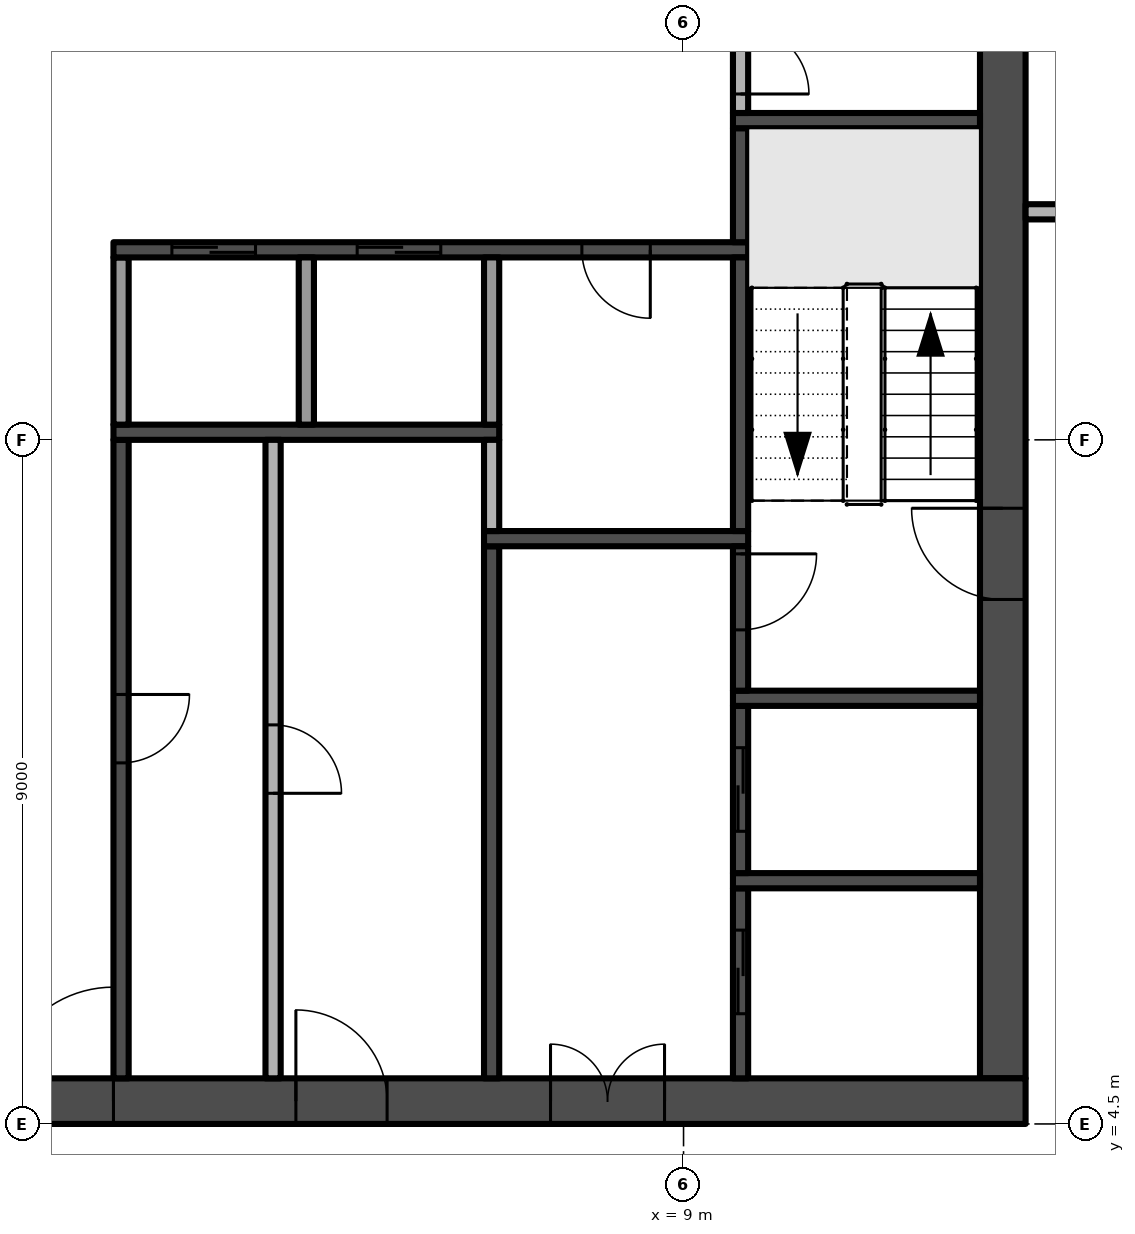
"""IFC4 building model, lengths in metres.
Left out: names, types, materials, properties, quantities, classifications, styles, units other than length and angle.
Written with IfcOpenShell. Run it as: python <this file> out.ifc"""

import sys

from ifc_helpers import new_model, si_unit, direction, frame, frame_2d, origin, place, context, subcontext, project, spatial, rectangle, extrude, element, fill, save


model = new_model("IFC4")
c1 = context("Model", 3, precision=1e-05, world=origin(), true_north=direction((0.0, 1.0)))
c2 = subcontext(c1, "Body", "Model", "MODEL_VIEW")
j1 = project(units=[si_unit("LENGTHUNIT", "METRE"), si_unit("PLANEANGLEUNIT", "RADIAN")], contexts=[c1])
p1 = place(None, origin())
s1 = spatial("IfcSite", under=j1, at=p1, CompositionType="ELEMENT")
p2 = place(p1, origin())
s2 = spatial("IfcBuilding", under=s1, at=p2, CompositionType="ELEMENT")
p3 = place(p2, frame((0.0, 0.0, 269.2)))
s3 = spatial("IfcBuildingStorey", under=s2, at=p3, CompositionType="ELEMENT", Elevation=269.2)
p4 = place(p3, frame((-13.5, 4.8, -0.3), z_axis=(0.0, 0.0, 1.0), x_axis=(1.0, 0.0, 0.0)))
e1 = element("IfcWall", 1, at=p4, inside=s3, PredefinedType="SHEAR", context=c2, shape_type="SweptSolid", body=[
    extrude(rectangle(XDim=27.0, YDim=0.6, at=frame_2d((13.5, 0.0))), origin(), (0.0, 0.0, 1.0), 3.8),
])
p5 = place(p4, frame((12.0, 0.0, 0.3)))
e2 = element("IfcOpeningElement", 2, at=p5, cuts=e1, PredefinedType="OPENING", context=c2, shape_type="SweptSolid", body=[
    extrude(rectangle(XDim=3.0, YDim=2.4, at=frame_2d((1.5, 1.2))), frame((0.0, 0.31, 0.0), z_axis=(0.0, -1.0, 0.0), x_axis=(1.0, 0.0, 0.0)), (0.0, 0.0, 1.0), 0.62),
])
p6 = place(p4, frame((4.9, 0.0, 0.3)))
e3 = element("IfcOpeningElement", 3, at=p6, cuts=e1, PredefinedType="OPENING", context=c2, shape_type="SweptSolid", body=[
    extrude(rectangle(XDim=1.2, YDim=2.2, at=frame_2d((0.6, 1.1))), frame((0.0, 0.31, 0.0), z_axis=(0.0, -1.0, 0.0), x_axis=(1.0, 0.0, 0.0)), (0.0, 0.0, 1.0), 0.62),
])
p7 = place(p4, frame((20.75, 0.0, 0.3)))
e4 = element("IfcOpeningElement", 4, at=p7, cuts=e1, PredefinedType="OPENING", context=c2, shape_type="SweptSolid", body=[
    extrude(rectangle(XDim=1.5, YDim=2.2, at=frame_2d((0.75, 1.1))), frame((0.0, 0.31, 0.0), z_axis=(0.0, -1.0, 0.0), x_axis=(1.0, 0.0, 0.0)), (0.0, 0.0, 1.0), 0.62),
])
p8 = place(p4, frame((17.4, 0.0, 0.3)))
e5 = element("IfcOpeningElement", 5, at=p8, cuts=e1, PredefinedType="OPENING", context=c2, shape_type="SweptSolid", body=[
    extrude(rectangle(XDim=1.2, YDim=2.2, at=frame_2d((0.6, 1.1))), frame((0.0, 0.31, 0.0), z_axis=(0.0, -1.0, 0.0), x_axis=(1.0, 0.0, 0.0)), (0.0, 0.0, 1.0), 0.62),
])
p9 = place(p3, frame((13.2, 5.1, -0.3), z_axis=(0.0, 0.0, 1.0), x_axis=(0.0, 1.0, 0.0)))
e6 = element("IfcWall", 6, at=p9, inside=s3, PredefinedType="SHEAR", context=c2, shape_type="SweptSolid", body=[
    extrude(rectangle(XDim=16.8, YDim=0.6, at=frame_2d((8.4, 0.0))), origin(), (0.0, 0.0, 1.0), 3.8),
])
p10 = place(p9, frame((6.3, 0.0, 0.3)))
e7 = element("IfcOpeningElement", 7, at=p10, cuts=e6, PredefinedType="OPENING", context=c2, shape_type="SweptSolid", body=[
    extrude(rectangle(XDim=1.2, YDim=2.2, at=frame_2d((0.6, 1.1))), frame((0.0, 0.31, 0.0), z_axis=(0.0, -1.0, 0.0), x_axis=(1.0, 0.0, 0.0)), (0.0, 0.0, 1.0), 0.62),
])
p11 = place(p3, frame((1.6, 13.5, 0.0), z_axis=(0.0, 0.0, 1.0), x_axis=(0.0, -1.0, 0.0)))
e8 = element("IfcWall", 8, at=p11, inside=s3, PredefinedType="SHEAR", context=c2, shape_type="SweptSolid", body=[
    extrude(rectangle(XDim=8.4, YDim=0.2, at=frame_2d((4.2, 0.0))), origin(), (0.0, 0.0, 1.0), 3.5),
])
p12 = place(p11, frame((3.35, 0.0, 0.0)))
e9 = element("IfcOpeningElement", 9, at=p12, cuts=e8, PredefinedType="OPENING", context=c2, shape_type="SweptSolid", body=[
    extrude(rectangle(XDim=0.9, YDim=2.1, at=frame_2d((0.45, 1.05))), frame((0.0, 0.11, 0.0), z_axis=(0.0, -1.0, 0.0), x_axis=(1.0, 0.0, 0.0)), (0.0, 0.0, 1.0), 0.22),
])
p13 = place(p3, frame((1.5, 13.6, 0.0), z_axis=(0.0, 0.0, 1.0), x_axis=(1.0, 0.0, 0.0)))
e10 = element("IfcWall", 10, at=p13, inside=s3, PredefinedType="SHEAR", context=c2, shape_type="SweptSolid", body=[
    extrude(rectangle(XDim=5.075, YDim=0.2, at=frame_2d((2.538, 0.0))), origin(), (0.0, 0.0, 1.0), 3.5),
])
p14 = place(p3, frame((1.6, 13.7, 0.0), z_axis=(0.0, 0.0, 1.0), x_axis=(0.0, 1.0, 0.0)))
e11 = element("IfcWall", 11, at=p14, inside=s3, PredefinedType="PARTITIONING", context=c2, shape_type="SweptSolid", body=[
    extrude(rectangle(XDim=2.2, YDim=0.2, at=frame_2d((1.1, 0.0))), origin(), (0.0, 0.0, 1.0), 3.5),
])
p15 = place(p3, frame((9.85, 16.0, 0.0), z_axis=(0.0, 0.0, 1.0), x_axis=(-1.0, 0.0, 0.0)))
e12 = element("IfcWall", 12, at=p15, inside=s3, PredefinedType="SHEAR", context=c2, shape_type="SweptSolid", body=[
    extrude(rectangle(XDim=8.35, YDim=0.2, at=frame_2d((4.175, 0.0))), origin(), (0.0, 0.0, 1.0), 3.5),
])
p16 = place(p15, frame((6.481, 0.0, 0.0)))
e13 = element("IfcOpeningElement", 13, at=p16, cuts=e12, PredefinedType="OPENING", context=c2, shape_type="SweptSolid", body=[
    extrude(rectangle(XDim=1.1, YDim=2.1, at=frame_2d((0.55, 1.05))), frame((0.0, 0.11, 0.0), z_axis=(0.0, -1.0, 0.0), x_axis=(1.0, 0.0, 0.0)), (0.0, 0.0, 1.0), 0.22),
])
p17 = place(p15, frame((4.044, 0.0, 0.0)))
e14 = element("IfcOpeningElement", 14, at=p17, cuts=e12, PredefinedType="OPENING", context=c2, shape_type="SweptSolid", body=[
    extrude(rectangle(XDim=1.1, YDim=2.1, at=frame_2d((0.55, 1.05))), frame((0.0, 0.11, 0.0), z_axis=(0.0, -1.0, 0.0), x_axis=(1.0, 0.0, 0.0)), (0.0, 0.0, 1.0), 0.22),
])
p18 = place(p15, frame((1.288, 0.0, 0.0)))
e15 = element("IfcOpeningElement", 15, at=p18, cuts=e12, PredefinedType="OPENING", context=c2, shape_type="SweptSolid", body=[
    extrude(rectangle(XDim=0.9, YDim=2.1, at=frame_2d((0.45, 1.05))), frame((0.0, 0.11, 0.0), z_axis=(0.0, -1.0, 0.0), x_axis=(1.0, 0.0, 0.0)), (0.0, 0.0, 1.0), 0.22),
])
p19 = place(p3, frame((3.6, 13.5, 0.0), z_axis=(0.0, 0.0, 1.0), x_axis=(0.0, -1.0, 0.0)))
e16 = element("IfcWall", 16, at=p19, inside=s3, PredefinedType="PARTITIONING", context=c2, shape_type="SweptSolid", body=[
    extrude(rectangle(XDim=8.4, YDim=0.2, at=frame_2d((4.2, 0.0))), origin(), (0.0, 0.0, 1.0), 3.5),
])
p20 = place(p19, frame((3.75, 0.0, 0.0)))
e17 = element("IfcOpeningElement", 17, at=p20, cuts=e16, PredefinedType="OPENING", context=c2, shape_type="SweptSolid", body=[
    extrude(rectangle(XDim=0.9, YDim=2.1, at=frame_2d((0.45, 1.05))), frame((0.0, 0.11, 0.0), z_axis=(0.0, -1.0, 0.0), x_axis=(1.0, 0.0, 0.0)), (0.0, 0.0, 1.0), 0.22),
])
p21 = place(p3, frame((4.037, 13.7, 0.0), z_axis=(0.0, 0.0, 1.0), x_axis=(0.0, 1.0, 0.0)))
e18 = element("IfcWall", 18, at=p21, inside=s3, PredefinedType="PARTITIONING", context=c2, shape_type="SweptSolid", body=[
    extrude(rectangle(XDim=2.2, YDim=0.2, at=frame_2d((1.1, 0.0))), origin(), (0.0, 0.0, 1.0), 3.5),
])
p22 = place(p3, frame((6.475, 5.1, 0.0), z_axis=(0.0, 0.0, 1.0), x_axis=(0.0, 1.0, 0.0)))
e19 = element("IfcWall", 19, at=p22, inside=s3, PredefinedType="SHEAR", context=c2, shape_type="SweptSolid", body=[
    extrude(rectangle(XDim=7.0, YDim=0.2, at=frame_2d((3.5, 0.0))), origin(), (0.0, 0.0, 1.0), 3.5),
])
p23 = place(p3, frame((6.375, 12.2, 0.0), z_axis=(0.0, 0.0, 1.0), x_axis=(1.0, 0.0, 0.0)))
e20 = element("IfcWall", 20, at=p23, inside=s3, PredefinedType="SHEAR", context=c2, shape_type="SweptSolid", body=[
    extrude(rectangle(XDim=3.475, YDim=0.2, at=frame_2d((1.738, 0.0))), origin(), (0.0, 0.0, 1.0), 3.5),
])
p24 = place(p3, frame((6.475, 12.3, 0.0), z_axis=(0.0, 0.0, 1.0), x_axis=(0.0, 1.0, 0.0)))
e21 = element("IfcWall", 21, at=p24, inside=s3, PredefinedType="PARTITIONING", context=c2, shape_type="SweptSolid", body=[
    extrude(rectangle(XDim=1.2, YDim=0.2, at=frame_2d((0.6, 0.0))), origin(), (0.0, 0.0, 1.0), 3.5),
])
p25 = place(p3, frame((6.475, 13.7, 0.0), z_axis=(0.0, 0.0, 1.0), x_axis=(0.0, 1.0, 0.0)))
e22 = element("IfcWall", 22, at=p25, inside=s3, PredefinedType="PARTITIONING", context=c2, shape_type="SweptSolid", body=[
    extrude(rectangle(XDim=2.2, YDim=0.2, at=frame_2d((1.1, 0.0))), origin(), (0.0, 0.0, 1.0), 3.5),
])
p26 = place(p3, frame((9.75, 5.1, 0.0), z_axis=(0.0, 0.0, 1.0), x_axis=(0.0, 1.0, 0.0)))
e23 = element("IfcWall", 23, at=p26, inside=s3, PredefinedType="SHEAR", context=c2, shape_type="SweptSolid", body=[
    extrude(rectangle(XDim=2.5, YDim=0.2, at=frame_2d((1.25, 0.0))), origin(), (0.0, 0.0, 1.0), 3.5),
])
p27 = place(p26, frame((0.85, 0.0, 0.0)))
e24 = element("IfcOpeningElement", 24, at=p27, cuts=e23, PredefinedType="OPENING", context=c2, shape_type="SweptSolid", body=[
    extrude(rectangle(XDim=1.1, YDim=2.1, at=frame_2d((0.55, 1.05))), frame((0.0, 0.11, 0.0), z_axis=(0.0, -1.0, 0.0), x_axis=(1.0, 0.0, 0.0)), (0.0, 0.0, 1.0), 0.22),
])
p28 = place(p3, frame((9.65, 7.7, 0.0), z_axis=(0.0, 0.0, 1.0), x_axis=(1.0, 0.0, 0.0)))
e25 = element("IfcWall", 25, at=p28, inside=s3, PredefinedType="SHEAR", context=c2, shape_type="SweptSolid", body=[
    extrude(rectangle(XDim=3.25, YDim=0.2, at=frame_2d((1.625, 0.0))), origin(), (0.0, 0.0, 1.0), 3.5),
])
p29 = place(p3, frame((9.75, 7.8, 0.0), z_axis=(0.0, 0.0, 1.0), x_axis=(0.0, 1.0, 0.0)))
e26 = element("IfcWall", 26, at=p29, inside=s3, PredefinedType="SHEAR", context=c2, shape_type="SweptSolid", body=[
    extrude(rectangle(XDim=2.2, YDim=0.2, at=frame_2d((1.1, 0.0))), origin(), (0.0, 0.0, 1.0), 3.5),
])
p30 = place(p29, frame((0.55, 0.0, 0.0)))
e27 = element("IfcOpeningElement", 27, at=p30, cuts=e26, PredefinedType="OPENING", context=c2, shape_type="SweptSolid", body=[
    extrude(rectangle(XDim=1.1, YDim=2.1, at=frame_2d((0.55, 1.05))), frame((0.0, 0.11, 0.0), z_axis=(0.0, -1.0, 0.0), x_axis=(1.0, 0.0, 0.0)), (0.0, 0.0, 1.0), 0.22),
])
p31 = place(p3, frame((9.65, 10.1, 0.0), z_axis=(0.0, 0.0, 1.0), x_axis=(1.0, 0.0, 0.0)))
e28 = element("IfcWall", 28, at=p31, inside=s3, PredefinedType="SHEAR", context=c2, shape_type="SweptSolid", body=[
    extrude(rectangle(XDim=3.25, YDim=0.2, at=frame_2d((1.625, 0.0))), origin(), (0.0, 0.0, 1.0), 3.5),
])
p32 = place(p3, frame((9.75, 12.1, 0.0), z_axis=(0.0, 0.0, 1.0), x_axis=(0.0, -1.0, 0.0)))
e29 = element("IfcWall", 29, at=p32, inside=s3, PredefinedType="SHEAR", context=c2, shape_type="SweptSolid", body=[
    extrude(rectangle(XDim=1.9, YDim=0.2, at=frame_2d((0.95, 0.0))), origin(), (0.0, 0.0, 1.0), 3.5),
])
p33 = place(p32, frame((0.1, 0.0, 0.0)))
e30 = element("IfcOpeningElement", 30, at=p33, cuts=e29, PredefinedType="OPENING", context=c2, shape_type="SweptSolid", body=[
    extrude(rectangle(XDim=1.0, YDim=2.2, at=frame_2d((0.5, 1.1))), frame((0.0, 0.11, 0.0), z_axis=(0.0, -1.0, 0.0), x_axis=(1.0, 0.0, 0.0)), (0.0, 0.0, 1.0), 0.22),
])
p34 = place(p3, frame((9.75, 12.3, 0.0), z_axis=(0.0, 0.0, 1.0), x_axis=(0.0, 1.0, 0.0)))
e31 = element("IfcWall", 31, at=p34, inside=s3, PredefinedType="SHEAR", context=c2, shape_type="SweptSolid", body=[
    extrude(rectangle(XDim=3.6, YDim=0.2, at=frame_2d((1.8, 0.0))), origin(), (0.0, 0.0, 1.0), 3.5),
])
p35 = place(p3, frame((9.75, 16.1, 0.0), z_axis=(0.0, 0.0, 1.0), x_axis=(0.0, 1.0, 0.0)))
e32 = element("IfcWall", 32, at=p35, inside=s3, PredefinedType="SHEAR", context=c2, shape_type="SweptSolid", body=[
    extrude(rectangle(XDim=1.5, YDim=0.2, at=frame_2d((0.75, 0.0))), origin(), (0.0, 0.0, 1.0), 3.5),
])
p36 = place(p3, frame((9.65, 17.7, 0.0), z_axis=(0.0, 0.0, 1.0), x_axis=(1.0, 0.0, 0.0)))
e33 = element("IfcWall", 33, at=p36, inside=s3, PredefinedType="SHEAR", context=c2, shape_type="SweptSolid", body=[
    extrude(rectangle(XDim=3.25, YDim=0.2, at=frame_2d((1.625, 0.0))), origin(), (0.0, 0.0, 1.0), 3.5),
])
p37 = place(p3, frame((9.75, 19.2, 0.0), z_axis=(0.0, 0.0, 1.0), x_axis=(0.0, -1.0, 0.0)))
e34 = element("IfcWall", 34, at=p37, inside=s3, PredefinedType="PARTITIONING", context=c2, shape_type="SweptSolid", body=[
    extrude(rectangle(XDim=1.4, YDim=0.2, at=frame_2d((0.7, 0.0))), origin(), (0.0, 0.0, 1.0), 3.5),
])
p38 = place(p37, frame((0.25, 0.0, 0.0)))
e35 = element("IfcOpeningElement", 35, at=p38, cuts=e34, PredefinedType="OPENING", context=c2, shape_type="SweptSolid", body=[
    extrude(rectangle(XDim=0.9, YDim=2.1, at=frame_2d((0.45, 1.05))), frame((0.0, 0.11, 0.0), z_axis=(0.0, -1.0, 0.0), x_axis=(1.0, 0.0, 0.0)), (0.0, 0.0, 1.0), 0.22),
])
p39 = place(p3, frame((13.5, 16.5, 0.0), z_axis=(0.0, 0.0, 1.0), x_axis=(1.0, 0.0, 0.0)))
e36 = element("IfcWall", 36, at=p39, inside=s3, PredefinedType="PARTITIONING", context=c2, shape_type="SweptSolid", body=[
    extrude(rectangle(XDim=3.825, YDim=0.2, at=frame_2d((1.913, 0.0))), origin(), (0.0, 0.0, 1.0), 3.5),
])
p40 = place(p39, frame((1.55, 0.0, 0.0)))
e37 = element("IfcOpeningElement", 37, at=p40, cuts=e36, PredefinedType="OPENING", context=c2, shape_type="SweptSolid", body=[
    extrude(rectangle(XDim=0.9, YDim=2.1, at=frame_2d((0.45, 1.05))), frame((0.0, 0.11, 0.0), z_axis=(0.0, -1.0, 0.0), x_axis=(1.0, 0.0, 0.0)), (0.0, 0.0, 1.0), 0.22),
])
p41 = place(p5, frame((3.0, 0.0, 0.0), z_axis=(0.0, 0.0, 1.0), x_axis=(-1.0, 0.0, 0.0)))
e38 = element("IfcDoor", 38, at=p41, inside=s3, OperationType="DOUBLE_DOOR_SINGLE_SWING", PredefinedType="DOOR", context=c2, shape_type="SweptSolid", body=[
    extrude(rectangle(XDim=3.0, YDim=2.4, at=frame_2d((1.5, 1.2))), frame((0.0, 0.025, 0.0), z_axis=(0.0, -1.0, 0.0), x_axis=(1.0, 0.0, 0.0)), (0.0, 0.0, 1.0), 0.05),
])
fill(e2, e38)
p42 = place(p10, frame((1.2, 0.0, 0.0), z_axis=(0.0, 0.0, 1.0), x_axis=(-1.0, 0.0, 0.0)))
e39 = element("IfcDoor", 39, at=p42, inside=s3, OperationType="SINGLE_SWING_LEFT", PredefinedType="DOOR", context=c2, shape_type="SweptSolid", body=[
    extrude(rectangle(XDim=1.2, YDim=2.2, at=frame_2d((0.6, 1.1))), frame((0.0, 0.025, 0.0), z_axis=(0.0, -1.0, 0.0), x_axis=(1.0, 0.0, 0.0)), (0.0, 0.0, 1.0), 0.05),
])
fill(e7, e39)
p43 = place(p7, frame((1.5, 0.0, 0.0), z_axis=(0.0, 0.0, 1.0), x_axis=(-1.0, 0.0, 0.0)))
e40 = element("IfcDoor", 40, at=p43, inside=s3, OperationType="DOUBLE_DOOR_SINGLE_SWING", PredefinedType="DOOR", context=c2, shape_type="SweptSolid", body=[
    extrude(rectangle(XDim=1.5, YDim=2.2, at=frame_2d((0.75, 1.1))), frame((0.0, 0.025, 0.0), z_axis=(0.0, -1.0, 0.0), x_axis=(1.0, 0.0, 0.0)), (0.0, 0.0, 1.0), 0.05),
])
fill(e4, e40)
p44 = place(p8, frame((1.2, 0.0, 0.0), z_axis=(0.0, 0.0, 1.0), x_axis=(-1.0, 0.0, 0.0)))
e41 = element("IfcDoor", 41, at=p44, inside=s3, OperationType="SINGLE_SWING_RIGHT", PredefinedType="DOOR", context=c2, shape_type="SweptSolid", body=[
    extrude(rectangle(XDim=1.2, YDim=2.2, at=frame_2d((0.6, 1.1))), frame((0.0, 0.025, 0.0), z_axis=(0.0, -1.0, 0.0), x_axis=(1.0, 0.0, 0.0)), (0.0, 0.0, 1.0), 0.05),
])
fill(e5, e41)
p45 = place(p33, origin())
e42 = element("IfcDoor", 42, at=p45, inside=s3, OperationType="SINGLE_SWING_LEFT", PredefinedType="DOOR", context=c2, shape_type="SweptSolid", body=[
    extrude(rectangle(XDim=1.0, YDim=2.2, at=frame_2d((0.5, 1.1))), frame((0.0, 0.025, 0.0), z_axis=(0.0, -1.0, 0.0), x_axis=(1.0, 0.0, 0.0)), (0.0, 0.0, 1.0), 0.05),
])
fill(e30, e42)
p46 = place(p16, origin())
e43 = element("IfcDoor", 43, at=p46, inside=s3, OperationType="SLIDING_TO_RIGHT", PredefinedType="DOOR", context=c2, shape_type="SweptSolid", body=[
    extrude(rectangle(XDim=1.1, YDim=2.1, at=frame_2d((0.55, 1.05))), frame((0.0, 0.025, 0.0), z_axis=(0.0, -1.0, 0.0), x_axis=(1.0, 0.0, 0.0)), (0.0, 0.0, 1.0), 0.05),
])
fill(e13, e43)
p47 = place(p17, origin())
e44 = element("IfcDoor", 44, at=p47, inside=s3, OperationType="SLIDING_TO_RIGHT", PredefinedType="DOOR", context=c2, shape_type="SweptSolid", body=[
    extrude(rectangle(XDim=1.1, YDim=2.1, at=frame_2d((0.55, 1.05))), frame((0.0, 0.025, 0.0), z_axis=(0.0, -1.0, 0.0), x_axis=(1.0, 0.0, 0.0)), (0.0, 0.0, 1.0), 0.05),
])
fill(e14, e44)
p48 = place(p27, origin())
e45 = element("IfcDoor", 45, at=p48, inside=s3, OperationType="SLIDING_TO_RIGHT", PredefinedType="DOOR", context=c2, shape_type="SweptSolid", body=[
    extrude(rectangle(XDim=1.1, YDim=2.1, at=frame_2d((0.55, 1.05))), frame((0.0, 0.025, 0.0), z_axis=(0.0, -1.0, 0.0), x_axis=(1.0, 0.0, 0.0)), (0.0, 0.0, 1.0), 0.05),
])
fill(e24, e45)
p49 = place(p30, origin())
e46 = element("IfcDoor", 46, at=p49, inside=s3, OperationType="SLIDING_TO_RIGHT", PredefinedType="DOOR", context=c2, shape_type="SweptSolid", body=[
    extrude(rectangle(XDim=1.1, YDim=2.1, at=frame_2d((0.55, 1.05))), frame((0.0, 0.025, 0.0), z_axis=(0.0, -1.0, 0.0), x_axis=(1.0, 0.0, 0.0)), (0.0, 0.0, 1.0), 0.05),
])
fill(e27, e46)
p50 = place(p12, origin())
e47 = element("IfcDoor", 47, at=p50, inside=s3, OperationType="SINGLE_SWING_LEFT", PredefinedType="DOOR", context=c2, shape_type="SweptSolid", body=[
    extrude(rectangle(XDim=0.9, YDim=2.1, at=frame_2d((0.45, 1.05))), frame((0.0, 0.025, 0.0), z_axis=(0.0, -1.0, 0.0), x_axis=(1.0, 0.0, 0.0)), (0.0, 0.0, 1.0), 0.05),
])
fill(e9, e47)
p51 = place(p18, origin())
e48 = element("IfcDoor", 48, at=p51, inside=s3, OperationType="SINGLE_SWING_LEFT", PredefinedType="DOOR", context=c2, shape_type="SweptSolid", body=[
    extrude(rectangle(XDim=0.9, YDim=2.1, at=frame_2d((0.45, 1.05))), frame((0.0, 0.025, 0.0), z_axis=(0.0, -1.0, 0.0), x_axis=(1.0, 0.0, 0.0)), (0.0, 0.0, 1.0), 0.05),
])
fill(e15, e48)
p52 = place(p38, origin())
e49 = element("IfcDoor", 49, at=p52, inside=s3, OperationType="SINGLE_SWING_RIGHT", PredefinedType="DOOR", context=c2, shape_type="SweptSolid", body=[
    extrude(rectangle(XDim=0.9, YDim=2.1, at=frame_2d((0.45, 1.05))), frame((0.0, 0.025, 0.0), z_axis=(0.0, -1.0, 0.0), x_axis=(1.0, 0.0, 0.0)), (0.0, 0.0, 1.0), 0.05),
])
fill(e35, e49)
p53 = place(p20, origin())
e50 = element("IfcDoor", 50, at=p53, inside=s3, OperationType="SINGLE_SWING_RIGHT", PredefinedType="DOOR", context=c2, shape_type="SweptSolid", body=[
    extrude(rectangle(XDim=0.9, YDim=2.1, at=frame_2d((0.45, 1.05))), frame((0.0, 0.025, 0.0), z_axis=(0.0, -1.0, 0.0), x_axis=(1.0, 0.0, 0.0)), (0.0, 0.0, 1.0), 0.05),
])
fill(e17, e50)
save(model, sys.argv[1])
